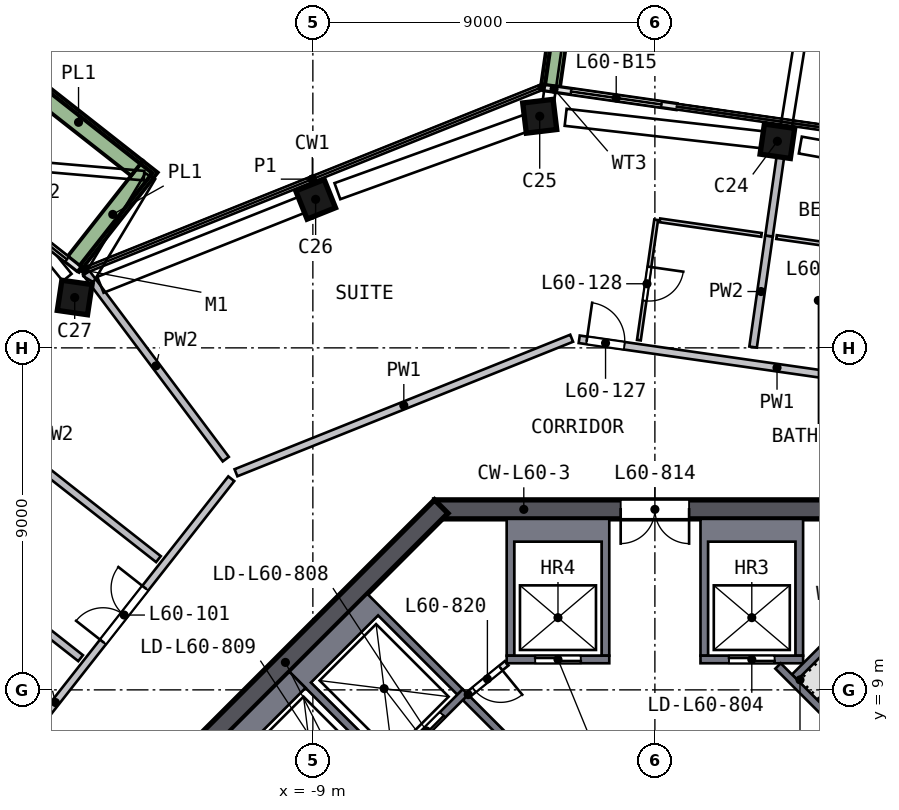
"""IFC4 building model, lengths in metres.
Left out: names, types, materials, properties, quantities, classifications, styles, units other than length and angle.
Written with IfcOpenShell. Run it as: python <this file> out.ifc"""

import sys

from ifc_helpers import new_model, si_unit, direction, frame, frame_2d, origin, origin_2d, place, context, subcontext, project, spatial, polyline, rectangle, outline, extrude, element, fill, save


model = new_model("IFC4")
c1 = context("Model", 3, precision=1e-05, world=origin(), true_north=direction((0.0, 1.0)))
c2 = subcontext(c1, "Body", "Model", "MODEL_VIEW")
j1 = project(units=[si_unit("LENGTHUNIT", "METRE"), si_unit("PLANEANGLEUNIT", "RADIAN")], contexts=[c1])
p1 = place(None, origin())
s1 = spatial("IfcSite", under=j1, at=p1, CompositionType="ELEMENT")
p2 = place(p1, origin())
s2 = spatial("IfcBuilding", under=s1, at=p2, CompositionType="ELEMENT")
p3 = place(p2, frame((0.0, 0.0, 244.5)))
s3 = spatial("IfcBuildingStorey", under=s2, at=p3, CompositionType="ELEMENT", Elevation=244.5)
p4 = place(p3, frame((3.358, 23.419, 0.0), z_axis=(-0.111487333, 0.015057634, 0.993651771), x_axis=(-0.98354748, 0.141347432, -0.112495591)))
e1 = element("IfcColumn", 1, at=p4, inside=s3, PredefinedType="COLUMN", context=c2, shape_type="SweptSolid", body=[
    extrude(rectangle(XDim=0.8, YDim=0.8, at=origin_2d()), origin(), (0.0, 0.0, 1.0), 3.21),
])
p5 = place(p3, frame((-2.892, 24.113, 0.0), z_axis=(-0.114565473, -0.014748309, 0.993306217), x_axis=(0.986218273, 0.118455501, 0.115506758)))
e2 = element("IfcColumn", 2, at=p5, inside=s3, PredefinedType="COLUMN", context=c2, shape_type="SweptSolid", body=[
    extrude(rectangle(XDim=0.8, YDim=0.8, at=origin_2d()), origin(), (0.0, 0.0, 1.0), 3.211),
])
p6 = place(p3, frame((-8.801, 21.96, 0.0), z_axis=(-0.104110118, -0.042739143, 0.993647044), x_axis=(-0.922375739, -0.369538016, -0.11253733)))
e3 = element("IfcColumn", 3, at=p6, inside=s3, PredefinedType="COLUMN", context=c2, shape_type="SweptSolid", body=[
    extrude(rectangle(XDim=0.8, YDim=0.8, at=origin_2d()), origin(), (0.0, 0.0, 1.0), 3.21),
])
p7 = place(p3, frame((-15.156, 19.413, 0.0), z_axis=(-0.091665964, -0.072815915, 0.993123957), x_axis=(0.985702737, -0.148229751, 0.080112766)))
e4 = element("IfcColumn", 4, at=p7, inside=s3, PredefinedType="COLUMN", context=c2, shape_type="SweptSolid", body=[
    extrude(rectangle(XDim=0.8, YDim=0.8, at=origin_2d()), origin(), (0.0, 0.0, 1.0), 3.212),
])
p8 = place(p3, frame((5.799, 13.75, 0.0), z_axis=(0.0, 0.0, 1.0), x_axis=(-1.0, 0.0, 0.0)))
e5 = element("IfcWall", 5, at=p8, inside=s3, PredefinedType="SHEAR", context=c2, shape_type="SweptSolid", body=[
    extrude(rectangle(XDim=11.598, YDim=0.5, at=frame_2d((5.799, 0.0))), origin(), (0.0, 0.0, 1.0), 3.5),
])
p9 = place(p8, frame((4.899, 0.0, 0.0)))
e6 = element("IfcOpeningElement", 6, at=p9, cuts=e5, PredefinedType="OPENING", context=c2, shape_type="SweptSolid", body=[
    extrude(rectangle(XDim=1.8, YDim=2.1, at=frame_2d((0.9, 1.05))), frame((0.0, 0.26, 0.0), z_axis=(0.0, -1.0, 0.0), x_axis=(1.0, 0.0, 0.0)), (0.0, 0.0, 1.0), 0.52),
])
p10 = place(p3, frame((-5.622, 13.823, 0.0), z_axis=(0.0, 0.0, 1.0), x_axis=(-0.707106781, -0.707106781, 0.0)))
e7 = element("IfcWall", 7, at=p10, inside=s3, PredefinedType="SHEAR", context=c2, shape_type="SweptSolid", body=[
    extrude(rectangle(XDim=11.598, YDim=0.5, at=frame_2d((5.799, 0.0))), origin(), (0.0, 0.0, 1.0), 3.5),
])
p11 = place(p3, frame((-15.159, 20.083, 0.0), z_axis=(0.0, 0.0, 1.0), x_axis=(-0.786307288, 0.617835617, 0.0)))
e8 = element("IfcWall", 8, at=p11, inside=s3, PredefinedType="SOLIDWALL", context=c2, shape_type="SweptSolid", body=[
    extrude(rectangle(XDim=2.3, YDim=0.15, at=frame_2d((1.15, 0.0))), origin(), (0.0, 0.0, 1.0), 2.525),
])
p12 = place(p11, frame((0.4, 0.0, 0.0)))
e9 = element("IfcOpeningElement", 9, at=p12, cuts=e8, PredefinedType="OPENING", context=c2, shape_type="SweptSolid", body=[
    extrude(rectangle(XDim=1.5, YDim=2.4, at=frame_2d((0.75, 1.2))), frame((0.0, 0.085, 0.0), z_axis=(0.0, -1.0, 0.0), x_axis=(1.0, 0.0, 0.0)), (0.0, 0.0, 1.0), 0.17),
])
p13 = place(p3, frame((0.566, 24.35, 0.0), z_axis=(0.0, 0.0, 1.0), x_axis=(-0.989878305, 0.141918786, 0.0)))
e10 = element("IfcWall", 10, at=p13, inside=s3, PredefinedType="SOLIDWALL", context=c2, shape_type="SweptSolid", body=[
    extrude(rectangle(XDim=3.504, YDim=0.15, at=frame_2d((1.752, 0.0))), origin(), (0.0, 0.0, 1.0), 2.525),
])
p14 = place(p13, frame((0.4, 0.0, 0.0)))
e11 = element("IfcOpeningElement", 11, at=p14, cuts=e10, PredefinedType="OPENING", context=c2, shape_type="SweptSolid", body=[
    extrude(rectangle(XDim=2.4, YDim=2.4, at=frame_2d((1.2, 1.2))), frame((0.0, 0.085, 0.0), z_axis=(0.0, -1.0, 0.0), x_axis=(1.0, 0.0, 0.0)), (0.0, 0.0, 1.0), 0.17),
])
p15 = place(p3, frame((11.012, 25.907, 0.0), z_axis=(0.0, 0.0, 1.0), x_axis=(-0.98987428, 0.141946855, 0.0)))
e12 = element("IfcWall", 12, at=p15, inside=s3, PredefinedType="SOLIDWALL", context=c2, shape_type="SweptSolid", body=[
    extrude(rectangle(XDim=13.723, YDim=0.5, at=frame_2d((6.862, 0.0))), origin(), (0.0, 0.0, 1.0), 0.7),
])
p16 = place(p3, frame((-2.36, 27.573, 0.0), z_axis=(0.0, 0.0, 1.0), x_axis=(-0.1419279, -0.989876998, 0.0)))
e13 = element("IfcWall", 13, at=p16, inside=s3, PredefinedType="SOLIDWALL", context=c2, shape_type="SweptSolid", body=[
    extrude(rectangle(XDim=2.699, YDim=0.5, at=frame_2d((1.35, 0.0))), origin(), (0.0, 0.0, 1.0), 0.7),
])
p17 = place(p3, frame((-15.254, 20.254, 0.0), z_axis=(0.0, 0.0, 1.0), x_axis=(0.617858626, 0.786289208, 0.0)))
e14 = element("IfcWall", 14, at=p17, inside=s3, PredefinedType="SOLIDWALL", context=c2, shape_type="SweptSolid", body=[
    extrude(rectangle(XDim=3.199, YDim=0.5, at=frame_2d((1.6, 0.0))), origin(), (0.0, 0.0, 1.0), 0.7),
])
p18 = place(p3, frame((-13.628, 22.728, 0.0), z_axis=(0.0, 0.0, 1.0), x_axis=(-0.786259848, 0.617895988, 0.0)))
e15 = element("IfcWall", 15, at=p18, inside=s3, PredefinedType="SOLIDWALL", context=c2, shape_type="SweptSolid", body=[
    extrude(rectangle(XDim=3.911, YDim=0.5, at=frame_2d((1.956, 0.0))), origin(), (0.0, 0.0, 1.0), 0.7),
])
p19 = place(p3, origin())
e16 = element("IfcWall", 16, at=p19, inside=s3, PredefinedType="SOLIDWALL", context=c2, shape_type="SweptSolid", body=[
    extrude(outline(polyline([(3.9, 9.9), (3.7, 9.9), (3.7, 12.9), (1.4, 12.9), (1.4, 9.9), (1.2, 9.9), (1.2, 13.5), (3.9, 13.5), (3.9, 9.9)])), origin(), (0.0, 0.0, 1.0), 3.19),
])
p20 = place(p3, frame((1.2, 9.8, 0.0), z_axis=(0.0, 0.0, 1.0), x_axis=(1.0, 0.0, 0.0)))
e17 = element("IfcWall", 17, at=p20, inside=s3, PredefinedType="SOLIDWALL", context=c2, shape_type="SweptSolid", body=[
    extrude(rectangle(XDim=2.7, YDim=0.2, at=frame_2d((1.35, 0.0))), origin(), (0.0, 0.0, 1.0), 3.19),
])
p21 = place(p20, frame((0.75, 0.0, 0.0)))
e18 = element("IfcOpeningElement", 18, at=p21, cuts=e17, PredefinedType="OPENING", context=c2, shape_type="SweptSolid", body=[
    extrude(rectangle(XDim=1.2, YDim=2.1, at=frame_2d((0.6, 1.05))), frame((0.0, 0.11, 0.0), z_axis=(0.0, -1.0, 0.0), x_axis=(1.0, 0.0, 0.0)), (0.0, 0.0, 1.0), 0.22),
])
p22 = place(p3, origin())
e19 = element("IfcWall", 19, at=p22, inside=s3, PredefinedType="SOLIDWALL", context=c2, shape_type="SweptSolid", body=[
    extrude(outline(polyline([(-3.9, 13.5), (-1.2, 13.5), (-1.2, 9.9), (-1.4, 9.9), (-1.4, 12.9), (-3.7, 12.9), (-3.7, 9.9), (-3.9, 9.9), (-3.9, 13.5)])), origin(), (0.0, 0.0, 1.0), 3.19),
])
p23 = place(p3, frame((-1.2, 9.8, 0.0), z_axis=(0.0, 0.0, 1.0), x_axis=(-1.0, 0.0, 0.0)))
e20 = element("IfcWall", 20, at=p23, inside=s3, PredefinedType="SOLIDWALL", context=c2, shape_type="SweptSolid", body=[
    extrude(rectangle(XDim=2.7, YDim=0.2, at=frame_2d((1.35, 0.0))), origin(), (0.0, 0.0, 1.0), 3.19),
])
p24 = place(p23, frame((0.75, 0.0, 0.0)))
e21 = element("IfcOpeningElement", 21, at=p24, cuts=e20, PredefinedType="OPENING", context=c2, shape_type="SweptSolid", body=[
    extrude(rectangle(XDim=1.2, YDim=2.1, at=frame_2d((0.6, 1.05))), frame((0.0, 0.11, 0.0), z_axis=(0.0, -1.0, 0.0), x_axis=(1.0, 0.0, 0.0)), (0.0, 0.0, 1.0), 0.22),
])
p25 = place(p3, origin())
e22 = element("IfcWall", 22, at=p25, inside=s3, PredefinedType="SOLIDWALL", context=c2, shape_type="SweptSolid", body=[
    extrude(outline(polyline([(-9.617, 9.475), (-7.566, 11.526), (-5.056, 9.016), (-5.197, 8.874), (-7.283, 10.96), (-9.051, 9.192), (-6.965, 7.106), (-7.106, 6.965), (-9.617, 9.475)])), origin(), (0.0, 0.0, 1.0), 3.19),
])
p26 = place(p3, frame((-4.985, 8.945, 0.0), z_axis=(0.0, 0.0, 1.0), x_axis=(-0.707106781, -0.707106781, 0.0)))
e23 = element("IfcWall", 23, at=p26, inside=s3, PredefinedType="SOLIDWALL", context=c2, shape_type="SweptSolid", body=[
    extrude(rectangle(XDim=2.9, YDim=0.2, at=frame_2d((1.45, 0.0))), origin(), (0.0, 0.0, 1.0), 3.19),
])
p27 = place(p26, frame((0.85, 0.0, 0.0)))
e24 = element("IfcOpeningElement", 24, at=p27, cuts=e23, PredefinedType="OPENING", context=c2, shape_type="SweptSolid", body=[
    extrude(rectangle(XDim=1.2, YDim=2.1, at=frame_2d((0.6, 1.05))), frame((0.0, 0.11, 0.0), z_axis=(0.0, -1.0, 0.0), x_axis=(1.0, 0.0, 0.0)), (0.0, 0.0, 1.0), 0.22),
])
p28 = place(p3, origin())
e25 = element("IfcWall", 25, at=p28, inside=s3, PredefinedType="SOLIDWALL", context=c2, shape_type="SweptSolid", body=[
    extrude(outline(polyline([(-11.526, 7.566), (-9.617, 9.475), (-9.192, 9.051), (-10.96, 7.283), (-8.874, 5.197), (-9.016, 5.056), (-11.526, 7.566)])), origin(), (0.0, 0.0, 1.0), 3.19),
])
p29 = place(p3, frame((3.24, 9.629, 0.0), z_axis=(0.0, 0.0, 1.0), x_axis=(0.707106781, -0.707106781, 0.0)))
e26 = element("IfcWall", 26, at=p29, inside=s3, PredefinedType="SOLIDWALL", context=c2, shape_type="SweptSolid", body=[
    extrude(rectangle(XDim=9.036, YDim=0.2, at=frame_2d((4.518, 0.0))), origin(), (0.0, 0.0, 1.0), 3.19),
])
p30 = place(p29, frame((7.018, 0.0, 0.0)))
e27 = element("IfcOpeningElement", 27, at=p30, cuts=e26, PredefinedType="OPENING", context=c2, shape_type="SweptSolid", body=[
    extrude(rectangle(XDim=1.2, YDim=2.1, at=frame_2d((0.6, 1.05))), frame((0.0, 0.11, 0.0), z_axis=(0.0, -1.0, 0.0), x_axis=(1.0, 0.0, 0.0)), (0.0, 0.0, 1.0), 0.22),
])
p31 = place(p3, frame((3.677, 9.334, 0.0), z_axis=(0.0, 0.0, 1.0), x_axis=(0.707078393, 0.707135168, 0.0)))
e28 = element("IfcWall", 28, at=p31, inside=s3, PredefinedType="SOLIDWALL", context=c2, shape_type="SweptSolid", body=[
    extrude(rectangle(XDim=4.3, YDim=0.2, at=frame_2d((2.15, 0.0))), origin(), (0.0, 0.0, 1.0), 3.19),
])
p32 = place(p3, frame((-3.005, 6.823, 0.0), z_axis=(0.0, 0.0, 1.0), x_axis=(-0.707106781, 0.707106781, 0.0)))
e29 = element("IfcWall", 29, at=p32, inside=s3, PredefinedType="SOLIDWALL", context=c2, shape_type="SweptSolid", body=[
    extrude(rectangle(XDim=2.8, YDim=0.2, at=frame_2d((1.4, 0.0))), origin(), (0.0, 0.0, 1.0), 3.19),
])
p33 = place(p3, frame((-3.9, 9.7, 0.0), z_axis=(0.0, 0.0, 1.0), x_axis=(-0.775559878, -0.631274009, 0.0)))
e30 = element("IfcWall", 30, at=p33, inside=s3, PredefinedType="PARTITIONING", context=c2, shape_type="SweptSolid", body=[
    extrude(rectangle(XDim=1.308, YDim=0.15, at=frame_2d((0.654, 0.0))), origin(), (0.0, 0.0, 1.0), 3.19),
])
p34 = place(p33, frame((0.204, 0.0, 0.0)))
e31 = element("IfcOpeningElement", 31, at=p34, cuts=e30, PredefinedType="OPENING", context=c2, shape_type="SweptSolid", body=[
    extrude(rectangle(XDim=0.9, YDim=2.1, at=frame_2d((0.45, 1.05))), frame((0.0, 0.085, 0.0), z_axis=(0.0, -1.0, 0.0), x_axis=(1.0, 0.0, 0.0)), (0.0, 0.0, 1.0), 0.17),
])
p35 = place(p3, frame((-16.903, 7.231, 0.0), z_axis=(0.0, 0.0, 1.0), x_axis=(0.617851641, 0.786294696, 0.0)))
e32 = element("IfcWall", 32, at=p35, inside=s3, PredefinedType="SOLIDWALL", context=c2, shape_type="SweptSolid", body=[
    extrude(rectangle(XDim=9.317, YDim=0.2, at=frame_2d((4.658, 0.0))), origin(), (0.0, 0.0, 1.0), 3.19),
])
p36 = place(p35, frame((3.854, 0.0, 0.0)))
e33 = element("IfcOpeningElement", 33, at=p36, cuts=e32, PredefinedType="OPENING", context=c2, shape_type="SweptSolid", body=[
    extrude(rectangle(XDim=1.8, YDim=2.1, at=frame_2d((0.9, 1.05))), frame((0.0, 0.11, 0.0), z_axis=(0.0, -1.0, 0.0), x_axis=(1.0, 0.0, 0.0)), (0.0, 0.0, 1.0), 0.22),
])
p37 = place(p3, frame((-2.19, 18.254, 0.0), z_axis=(0.0, 0.0, 1.0), x_axis=(-0.928228773, -0.372009873, 0.0)))
e34 = element("IfcWall", 34, at=p37, inside=s3, PredefinedType="SOLIDWALL", context=c2, shape_type="SweptSolid", body=[
    extrude(rectangle(XDim=9.516, YDim=0.2, at=frame_2d((4.758, 0.0))), origin(), (0.0, 0.0, 1.0), 3.19),
])
p38 = place(p3, frame((-1.991, 18.226, 0.0), z_axis=(0.0, 0.0, 1.0), x_axis=(0.98987168, -0.141964985, 0.0)))
e35 = element("IfcWall", 35, at=p38, inside=s3, PredefinedType="SOLIDWALL", context=c2, shape_type="SweptSolid", body=[
    extrude(rectangle(XDim=9.116, YDim=0.2, at=frame_2d((4.558, 0.0))), origin(), (0.0, 0.0, 1.0), 3.19),
])
p39 = place(p38, frame((0.2, 0.0, 0.0)))
e36 = element("IfcOpeningElement", 36, at=p39, cuts=e35, PredefinedType="OPENING", context=c2, shape_type="SweptSolid", body=[
    extrude(rectangle(XDim=1.0, YDim=2.1, at=frame_2d((0.5, 1.05))), frame((0.0, 0.11, 0.0), z_axis=(0.0, -1.0, 0.0), x_axis=(1.0, 0.0, 0.0)), (0.0, 0.0, 1.0), 0.22),
])
p40 = place(p3, frame((-15.112, 9.834, 0.0), z_axis=(0.0, 0.0, 1.0), x_axis=(-0.786285434, 0.617863429, 0.0)))
e37 = element("IfcWall", 37, at=p40, inside=s3, PredefinedType="SOLIDWALL", context=c2, shape_type="SweptSolid", body=[
    extrude(rectangle(XDim=14.161, YDim=0.2, at=frame_2d((7.081, 0.0))), origin(), (0.0, 0.0, 1.0), 3.19),
])
p41 = place(p40, frame((4.4, 0.0, 0.0)))
e38 = element("IfcOpeningElement", 38, at=p41, cuts=e37, PredefinedType="OPENING", context=c2, shape_type="SweptSolid", body=[
    extrude(rectangle(XDim=1.0, YDim=2.1, at=frame_2d((0.5, 1.05))), frame((0.0, 0.11, 0.0), z_axis=(0.0, -1.0, 0.0), x_axis=(1.0, 0.0, 0.0)), (0.0, 0.0, 1.0), 0.22),
])
p42 = place(p3, frame((-24.198, 21.19, 0.0), z_axis=(0.0, 0.0, 1.0), x_axis=(0.78629381, -0.61785277, 0.0)))
e39 = element("IfcWall", 39, at=p42, inside=s3, PredefinedType="SOLIDWALL", context=c2, shape_type="SweptSolid", body=[
    extrude(rectangle(XDim=14.161, YDim=0.2, at=frame_2d((7.08, 0.0))), origin(), (0.0, 0.0, 1.0), 3.19),
])
p43 = place(p42, frame((4.45, 0.0, 0.0)))
e40 = element("IfcOpeningElement", 40, at=p43, cuts=e39, PredefinedType="OPENING", context=c2, shape_type="SweptSolid", body=[
    extrude(rectangle(XDim=1.0, YDim=2.1, at=frame_2d((0.5, 1.05))), frame((0.0, 0.11, 0.0), z_axis=(0.0, -1.0, 0.0), x_axis=(1.0, 0.0, 0.0)), (0.0, 0.0, 1.0), 0.22),
])
p44 = place(p3, frame((-14.968, 19.979, 0.0), z_axis=(0.0, 0.0, 1.0), x_axis=(0.5995986, -0.800300893, 0.0)))
e41 = element("IfcWall", 41, at=p44, inside=s3, PredefinedType="SOLIDWALL", context=c2, shape_type="SweptSolid", body=[
    extrude(rectangle(XDim=6.132, YDim=0.2, at=frame_2d((3.066, 0.0))), origin(), (0.0, 0.0, 1.0), 3.19),
])
p45 = place(p3, frame((2.584, 18.021, 0.0), z_axis=(0.0, 0.0, 1.0), x_axis=(0.141965384, 0.989871623, 0.0)))
e42 = element("IfcWall", 42, at=p45, inside=s3, PredefinedType="SOLIDWALL", context=c2, shape_type="SweptSolid", body=[
    extrude(rectangle(XDim=2.953, YDim=0.2, at=frame_2d((1.476, 0.0))), origin(), (0.0, 0.0, 1.0), 3.19),
])
p46 = place(p3, frame((3.003, 20.944, 0.0), z_axis=(0.0, 0.0, 1.0), x_axis=(0.141931131, 0.989876535, 0.0)))
e43 = element("IfcWall", 43, at=p46, inside=s3, PredefinedType="SOLIDWALL", context=c2, shape_type="SweptSolid", body=[
    extrude(rectangle(XDim=2.95, YDim=0.2, at=frame_2d((1.475, 0.0))), origin(), (0.0, 0.0, 1.0), 3.19),
])
p47 = place(p3, frame((0.033, 21.37, 0.0), z_axis=(0.0, 0.0, 1.0), x_axis=(-0.141912692, -0.989879178, 0.0)))
e44 = element("IfcWall", 44, at=p47, inside=s3, PredefinedType="PARTITIONING", context=c2, shape_type="SweptSolid", body=[
    extrude(rectangle(XDim=3.2, YDim=0.1, at=frame_2d((1.6, 0.0))), origin(), (0.0, 0.0, 1.0), 3.19),
])
p48 = place(p47, frame((1.25, 0.0, 0.0)))
e45 = element("IfcOpeningElement", 45, at=p48, cuts=e44, PredefinedType="OPENING", context=c2, shape_type="SweptSolid", body=[
    extrude(rectangle(XDim=0.9, YDim=2.1, at=frame_2d((0.45, 1.05))), frame((0.0, 0.06, 0.0), z_axis=(0.0, -1.0, 0.0), x_axis=(1.0, 0.0, 0.0)), (0.0, 0.0, 1.0), 0.12),
])
for number, where, z_axis, x_axis in (
    (46, (0.133, 21.356, 0.0), (0.0, 0.0, 1.0), (0.99, -0.142, 0.0)),
    (47, (5.874, 20.532, 0.0), (0.0, 0.0, 1.0), (-0.99, 0.142, 0.0)),
):
    element("IfcWall", number, at=place(p3, frame(where, z_axis=z_axis, x_axis=x_axis)), inside=s3, PredefinedType="PARTITIONING", context=c2, shape_type="SweptSolid", body=[
        extrude(rectangle(XDim=2.7, YDim=0.1, at=frame_2d((1.35, 0.0))), origin(), (0.0, 0.0, 1.0), 3.19),
    ])
p49 = place(p12, origin())
e48 = element("IfcDoor", 48, at=p49, inside=s3, OperationType="SLIDING_TO_LEFT", PredefinedType="DOOR", context=c2, shape_type="SweptSolid", body=[
    extrude(rectangle(XDim=1.5, YDim=2.4, at=frame_2d((0.75, 1.2))), frame((0.0, 0.025, 0.0), z_axis=(0.0, -1.0, 0.0), x_axis=(1.0, 0.0, 0.0)), (0.0, 0.0, 1.0), 0.05),
])
fill(e9, e48)
p50 = place(p14, origin())
e49 = element("IfcDoor", 49, at=p50, inside=s3, OperationType="SLIDING_TO_RIGHT", PredefinedType="DOOR", context=c2, shape_type="SweptSolid", body=[
    extrude(rectangle(XDim=2.4, YDim=2.4, at=frame_2d((1.2, 1.2))), frame((0.0, 0.025, 0.0), z_axis=(0.0, -1.0, 0.0), x_axis=(1.0, 0.0, 0.0)), (0.0, 0.0, 1.0), 0.05),
])
fill(e11, e49)
p51 = place(p21, origin())
e50 = element("IfcDoor", 50, at=p51, inside=s3, OperationType="DOUBLE_DOOR_SLIDING", PredefinedType="DOOR", context=c2, shape_type="SweptSolid", body=[
    extrude(rectangle(XDim=1.2, YDim=2.1, at=frame_2d((0.6, 1.05))), frame((0.0, 0.025, 0.0), z_axis=(0.0, -1.0, 0.0), x_axis=(1.0, 0.0, 0.0)), (0.0, 0.0, 1.0), 0.05),
])
fill(e18, e50)
p52 = place(p24, origin())
e51 = element("IfcDoor", 51, at=p52, inside=s3, OperationType="DOUBLE_DOOR_SLIDING", PredefinedType="DOOR", context=c2, shape_type="SweptSolid", body=[
    extrude(rectangle(XDim=1.2, YDim=2.1, at=frame_2d((0.6, 1.05))), frame((0.0, 0.025, 0.0), z_axis=(0.0, -1.0, 0.0), x_axis=(1.0, 0.0, 0.0)), (0.0, 0.0, 1.0), 0.05),
])
fill(e21, e51)
p53 = place(p27, origin())
e52 = element("IfcDoor", 52, at=p53, inside=s3, OperationType="DOUBLE_DOOR_SLIDING", PredefinedType="DOOR", context=c2, shape_type="SweptSolid", body=[
    extrude(rectangle(XDim=1.2, YDim=2.1, at=frame_2d((0.6, 1.05))), frame((0.0, 0.025, 0.0), z_axis=(0.0, -1.0, 0.0), x_axis=(1.0, 0.0, 0.0)), (0.0, 0.0, 1.0), 0.05),
])
fill(e24, e52)
p54 = place(p9, origin())
e53 = element("IfcDoor", 53, at=p54, inside=s3, OperationType="DOUBLE_DOOR_SINGLE_SWING", PredefinedType="DOOR", context=c2, shape_type="SweptSolid", body=[
    extrude(rectangle(XDim=1.8, YDim=2.1, at=frame_2d((0.9, 1.05))), frame((0.0, 0.025, 0.0), z_axis=(0.0, -1.0, 0.0), x_axis=(1.0, 0.0, 0.0)), (0.0, 0.0, 1.0), 0.05),
])
fill(e6, e53)
p55 = place(p34, origin())
e54 = element("IfcDoor", 54, at=p55, inside=s3, OperationType="SINGLE_SWING_LEFT", PredefinedType="DOOR", context=c2, shape_type="SweptSolid", body=[
    extrude(rectangle(XDim=0.9, YDim=2.1, at=frame_2d((0.45, 1.05))), frame((0.0, 0.025, 0.0), z_axis=(0.0, -1.0, 0.0), x_axis=(1.0, 0.0, 0.0)), (0.0, 0.0, 1.0), 0.05),
])
fill(e31, e54)
p56 = place(p36, origin())
e55 = element("IfcDoor", 55, at=p56, inside=s3, OperationType="DOUBLE_DOOR_SINGLE_SWING", PredefinedType="DOOR", context=c2, shape_type="SweptSolid", body=[
    extrude(rectangle(XDim=1.8, YDim=2.1, at=frame_2d((0.9, 1.05))), frame((0.0, 0.025, 0.0), z_axis=(0.0, -1.0, 0.0), x_axis=(1.0, 0.0, 0.0)), (0.0, 0.0, 1.0), 0.05),
])
fill(e33, e55)
p57 = place(p39, origin())
e56 = element("IfcDoor", 56, at=p57, inside=s3, OperationType="SINGLE_SWING_LEFT", PredefinedType="DOOR", context=c2, shape_type="SweptSolid", body=[
    extrude(rectangle(XDim=1.0, YDim=2.1, at=frame_2d((0.5, 1.05))), frame((0.0, 0.025, 0.0), z_axis=(0.0, -1.0, 0.0), x_axis=(1.0, 0.0, 0.0)), (0.0, 0.0, 1.0), 0.05),
])
fill(e36, e56)
p58 = place(p48, origin())
e57 = element("IfcDoor", 57, at=p58, inside=s3, OperationType="SINGLE_SWING_LEFT", PredefinedType="DOOR", context=c2, shape_type="SweptSolid", body=[
    extrude(rectangle(XDim=0.9, YDim=2.1, at=frame_2d((0.45, 1.05))), frame((0.0, 0.025, 0.0), z_axis=(0.0, -1.0, 0.0), x_axis=(1.0, 0.0, 0.0)), (0.0, 0.0, 1.0), 0.05),
])
fill(e45, e57)
save(model, sys.argv[1])
